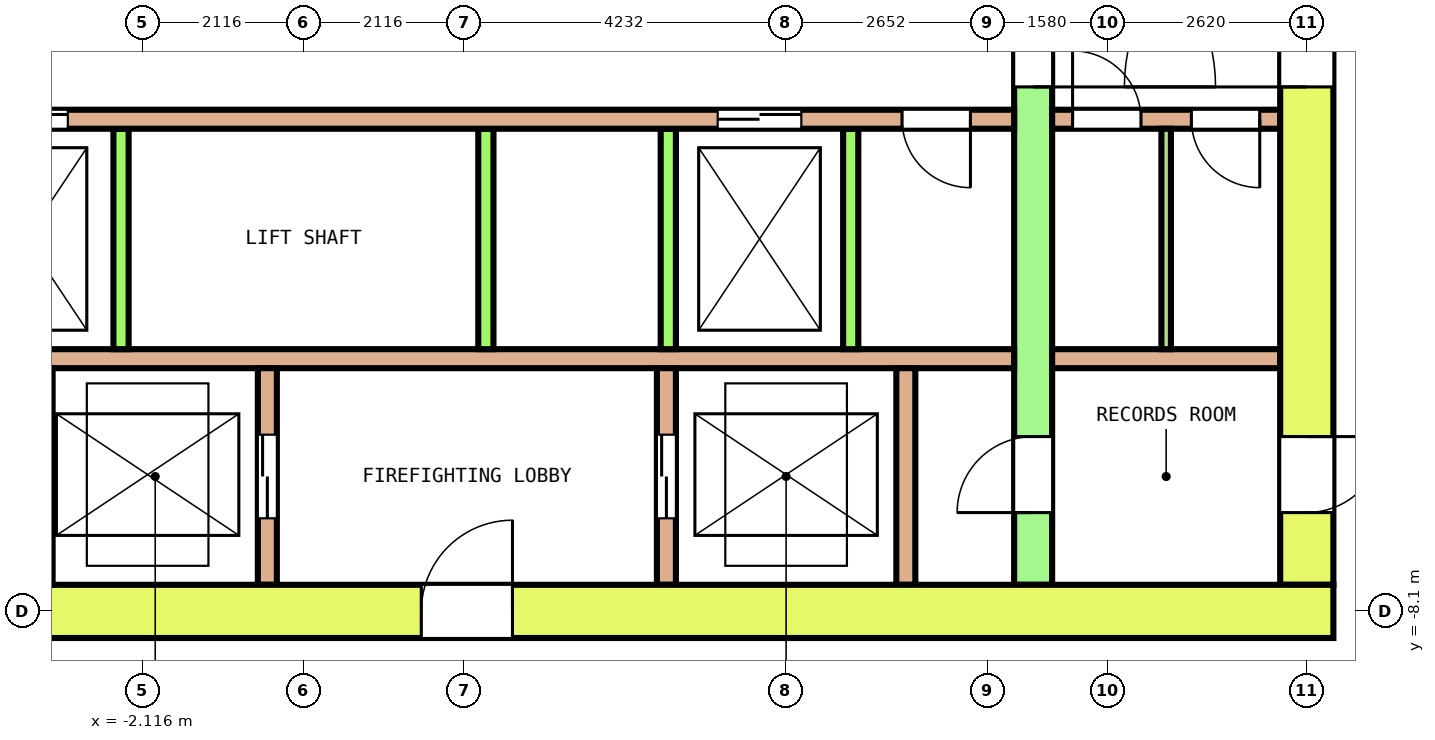
"""IFC4 building model, lengths in metres.
Left out: names, types, materials, properties, quantities, classifications, styles, units other than length and angle.
Written with IfcOpenShell. Run it as: python <this file> out.ifc"""

import sys

from ifc_helpers import new_model, si_unit, direction, frame, frame_2d, origin, place, context, subcontext, project, spatial, rectangle, extrude, element, fill, save


model = new_model("IFC4")
c1 = context("Model", 3, precision=1e-05, world=origin(), true_north=direction((0.0, 1.0)))
c2 = subcontext(c1, "Body", "Model", "MODEL_VIEW")
j1 = project(units=[si_unit("LENGTHUNIT", "METRE"), si_unit("PLANEANGLEUNIT", "RADIAN")], contexts=[c1])
p1 = place(None, origin())
s1 = spatial("IfcSite", under=j1, at=p1, CompositionType="ELEMENT")
p2 = place(p1, origin())
s2 = spatial("IfcBuilding", under=s1, at=p2, CompositionType="ELEMENT")
p3 = place(p2, frame((0.0, 0.0, 167.2)))
s3 = spatial("IfcBuildingStorey", under=s2, at=p3, CompositionType="ELEMENT", Elevation=167.2)
p4 = place(p3, frame((-13.55, -8.1, 0.0), z_axis=(0.0, 0.0, 1.0), x_axis=(1.0, 0.0, 0.0)))
e1 = element("IfcWall", 1, at=p4, inside=s3, PredefinedType="SHEAR", context=c2, shape_type="SweptSolid", body=[
    extrude(rectangle(XDim=27.1, YDim=0.7, at=frame_2d((13.55, 0.0))), origin(), (0.0, 0.0, 1.0), 4.1),
])
p5 = place(p4, frame((15.1, 0.0, 0.0)))
e2 = element("IfcOpeningElement", 2, at=p5, cuts=e1, PredefinedType="OPENING", context=c2, shape_type="SweptSolid", body=[
    extrude(rectangle(XDim=1.2, YDim=2.1, at=frame_2d((0.6, 1.05))), frame((0.0, 0.36, 0.0), z_axis=(0.0, -1.0, 0.0), x_axis=(1.0, 0.0, 0.0)), (0.0, 0.0, 1.0), 0.72),
])
p6 = place(p3, frame((13.2, -7.75, 0.0), z_axis=(0.0, 0.0, 1.0), x_axis=(0.0, 1.0, 0.0)))
e3 = element("IfcWall", 3, at=p6, inside=s3, PredefinedType="SHEAR", context=c2, shape_type="SweptSolid", body=[
    extrude(rectangle(XDim=15.5, YDim=0.7, at=frame_2d((7.75, 0.0))), origin(), (0.0, 0.0, 1.0), 4.1),
])
p7 = place(p6, frame((6.55, 0.0, 0.0)))
e4 = element("IfcOpeningElement", 4, at=p7, cuts=e3, PredefinedType="OPENING", context=c2, shape_type="SweptSolid", body=[
    extrude(rectangle(XDim=2.4, YDim=2.1, at=frame_2d((1.2, 1.05))), frame((0.0, 0.36, 0.0), z_axis=(0.0, -1.0, 0.0), x_axis=(1.0, 0.0, 0.0)), (0.0, 0.0, 1.0), 0.72),
])
p8 = place(p6, frame((13.45, 0.0, 0.0)))
e5 = element("IfcOpeningElement", 5, at=p8, cuts=e3, PredefinedType="OPENING", context=c2, shape_type="SweptSolid", body=[
    extrude(rectangle(XDim=1.2, YDim=2.1, at=frame_2d((0.6, 1.05))), frame((0.0, 0.36, 0.0), z_axis=(0.0, -1.0, 0.0), x_axis=(1.0, 0.0, 0.0)), (0.0, 0.0, 1.0), 0.72),
])
p9 = place(p6, frame((0.95, 0.0, 0.0)))
e6 = element("IfcOpeningElement", 6, at=p9, cuts=e3, PredefinedType="OPENING", context=c2, shape_type="SweptSolid", body=[
    extrude(rectangle(XDim=1.0, YDim=2.1, at=frame_2d((0.5, 1.05))), frame((0.0, 0.36, 0.0), z_axis=(0.0, -1.0, 0.0), x_axis=(1.0, 0.0, 0.0)), (0.0, 0.0, 1.0), 0.72),
])
p10 = place(p3, frame((9.6, -7.75, 0.0), z_axis=(0.0, 0.0, 1.0), x_axis=(0.0, 1.0, 0.0)))
e7 = element("IfcWall", 7, at=p10, inside=s3, PredefinedType="SHEAR", context=c2, shape_type="SweptSolid", body=[
    extrude(rectangle(XDim=15.5, YDim=0.5, at=frame_2d((7.75, 0.0))), origin(), (0.0, 0.0, 1.0), 4.1),
])
p11 = place(p10, frame((6.55, 0.0, 0.0)))
e8 = element("IfcOpeningElement", 8, at=p11, cuts=e7, PredefinedType="OPENING", context=c2, shape_type="SweptSolid", body=[
    extrude(rectangle(XDim=2.4, YDim=2.1, at=frame_2d((1.2, 1.05))), frame((0.0, 0.26, 0.0), z_axis=(0.0, -1.0, 0.0), x_axis=(1.0, 0.0, 0.0)), (0.0, 0.0, 1.0), 0.52),
])
p12 = place(p10, frame((13.45, 0.0, 0.0)))
e9 = element("IfcOpeningElement", 9, at=p12, cuts=e7, PredefinedType="OPENING", context=c2, shape_type="SweptSolid", body=[
    extrude(rectangle(XDim=1.2, YDim=2.1, at=frame_2d((0.6, 1.05))), frame((0.0, 0.26, 0.0), z_axis=(0.0, -1.0, 0.0), x_axis=(1.0, 0.0, 0.0)), (0.0, 0.0, 1.0), 0.52),
])
p13 = place(p10, frame((0.95, 0.0, 0.0)))
e10 = element("IfcOpeningElement", 10, at=p13, cuts=e7, PredefinedType="OPENING", context=c2, shape_type="SweptSolid", body=[
    extrude(rectangle(XDim=1.0, YDim=2.1, at=frame_2d((0.5, 1.05))), frame((0.0, 0.26, 0.0), z_axis=(0.0, -1.0, 0.0), x_axis=(1.0, 0.0, 0.0)), (0.0, 0.0, 1.0), 0.52),
])
p14 = place(p3, frame((-9.35, -1.625, 0.0), z_axis=(0.0, 0.0, 1.0), x_axis=(1.0, 0.0, 0.0)))
e11 = element("IfcWall", 11, at=p14, inside=s3, PredefinedType="SOLIDWALL", context=c2, shape_type="SweptSolid", body=[
    extrude(rectangle(XDim=18.7, YDim=0.25, at=frame_2d((9.35, 0.0))), origin(), (0.0, 0.0, 1.0), 4.1),
])
p15 = place(p14, frame((2.85, 0.0, 0.0)))
e12 = element("IfcOpeningElement", 12, at=p15, cuts=e11, PredefinedType="OPENING", context=c2, shape_type="SweptSolid", body=[
    extrude(rectangle(XDim=1.1, YDim=2.1, at=frame_2d((0.55, 1.05))), frame((0.0, 0.135, 0.0), z_axis=(0.0, -1.0, 0.0), x_axis=(1.0, 0.0, 0.0)), (0.0, 0.0, 1.0), 0.27),
])
p16 = place(p14, frame((5.15, 0.0, 0.0)))
e13 = element("IfcOpeningElement", 13, at=p16, cuts=e11, PredefinedType="OPENING", context=c2, shape_type="SweptSolid", body=[
    extrude(rectangle(XDim=1.1, YDim=2.1, at=frame_2d((0.55, 1.05))), frame((0.0, 0.135, 0.0), z_axis=(0.0, -1.0, 0.0), x_axis=(1.0, 0.0, 0.0)), (0.0, 0.0, 1.0), 0.27),
])
p17 = place(p14, frame((14.8, 0.0, 0.0)))
e14 = element("IfcOpeningElement", 14, at=p17, cuts=e11, PredefinedType="OPENING", context=c2, shape_type="SweptSolid", body=[
    extrude(rectangle(XDim=1.1, YDim=2.1, at=frame_2d((0.55, 1.05))), frame((0.0, 0.135, 0.0), z_axis=(0.0, -1.0, 0.0), x_axis=(1.0, 0.0, 0.0)), (0.0, 0.0, 1.0), 0.27),
])
p18 = place(p14, frame((0.575, 0.0, 0.0)))
e15 = element("IfcOpeningElement", 15, at=p18, cuts=e11, PredefinedType="OPENING", context=c2, shape_type="SweptSolid", body=[
    extrude(rectangle(XDim=0.9, YDim=2.1, at=frame_2d((0.45, 1.05))), frame((0.0, 0.135, 0.0), z_axis=(0.0, -1.0, 0.0), x_axis=(1.0, 0.0, 0.0)), (0.0, 0.0, 1.0), 0.27),
])
p19 = place(p14, frame((17.225, 0.0, 0.0)))
e16 = element("IfcOpeningElement", 16, at=p19, cuts=e11, PredefinedType="OPENING", context=c2, shape_type="SweptSolid", body=[
    extrude(rectangle(XDim=0.9, YDim=2.1, at=frame_2d((0.45, 1.05))), frame((0.0, 0.135, 0.0), z_axis=(0.0, -1.0, 0.0), x_axis=(1.0, 0.0, 0.0)), (0.0, 0.0, 1.0), 0.27),
])
p20 = place(p3, frame((9.85, -1.625, 0.0), z_axis=(0.0, 0.0, 1.0), x_axis=(1.0, 0.0, 0.0)))
e17 = element("IfcWall", 17, at=p20, inside=s3, PredefinedType="SOLIDWALL", context=c2, shape_type="SweptSolid", body=[
    extrude(rectangle(XDim=3.0, YDim=0.25, at=frame_2d((1.5, 0.0))), origin(), (0.0, 0.0, 1.0), 4.1),
])
p21 = place(p20, frame((0.269, 0.0, 0.0)))
e18 = element("IfcOpeningElement", 18, at=p21, cuts=e17, PredefinedType="OPENING", context=c2, shape_type="SweptSolid", body=[
    extrude(rectangle(XDim=0.9, YDim=2.1, at=frame_2d((0.45, 1.05))), frame((0.0, 0.135, 0.0), z_axis=(0.0, -1.0, 0.0), x_axis=(1.0, 0.0, 0.0)), (0.0, 0.0, 1.0), 0.27),
])
p22 = place(p20, frame((1.831, 0.0, 0.0)))
e19 = element("IfcOpeningElement", 19, at=p22, cuts=e17, PredefinedType="OPENING", context=c2, shape_type="SweptSolid", body=[
    extrude(rectangle(XDim=0.9, YDim=2.1, at=frame_2d((0.45, 1.05))), frame((0.0, 0.135, 0.0), z_axis=(0.0, -1.0, 0.0), x_axis=(1.0, 0.0, 0.0)), (0.0, 0.0, 1.0), 0.27),
])
p23 = place(p3, frame((-9.35, -4.775, 0.0), z_axis=(0.0, 0.0, 1.0), x_axis=(1.0, 0.0, 0.0)))
e20 = element("IfcWall", 20, at=p23, inside=s3, PredefinedType="SOLIDWALL", context=c2, shape_type="SweptSolid", body=[
    extrude(rectangle(XDim=18.7, YDim=0.25, at=frame_2d((9.35, 0.0))), origin(), (0.0, 0.0, 1.0), 4.1),
])
p24 = place(p3, frame((9.85, -4.775, 0.0), z_axis=(0.0, 0.0, 1.0), x_axis=(1.0, 0.0, 0.0)))
e21 = element("IfcWall", 21, at=p24, inside=s3, PredefinedType="SOLIDWALL", context=c2, shape_type="SweptSolid", body=[
    extrude(rectangle(XDim=3.0, YDim=0.25, at=frame_2d((1.5, 0.0))), origin(), (0.0, 0.0, 1.0), 4.1),
])
for number, where, z_axis, x_axis in (
    (22, (-2.4, -4.65, 0.0), (0.0, 0.0, 1.0), (0.0, 1.0, 0.0)),
    (23, (2.4, -4.65, 0.0), (0.0, 0.0, 1.0), (0.0, 1.0, 0.0)),
    (24, (4.8, -4.65, 0.0), (0.0, 0.0, 1.0), (0.0, 1.0, 0.0)),
    (25, (7.2, -4.65, 0.0), (0.0, 0.0, 1.0), (0.0, 1.0, 0.0)),
):
    element("IfcWall", number, at=place(p3, frame(where, z_axis=z_axis, x_axis=x_axis)), inside=s3, PredefinedType="SOLIDWALL", context=c2, shape_type="SweptSolid", body=[
        extrude(rectangle(XDim=2.9, YDim=0.2, at=frame_2d((1.45, 0.0))), origin(), (0.0, 0.0, 1.0), 4.1),
    ])
p25 = place(p3, frame((-0.475, -7.75, 0.0), z_axis=(0.0, 0.0, 1.0), x_axis=(0.0, 1.0, 0.0)))
e26 = element("IfcWall", 26, at=p25, inside=s3, PredefinedType="SOLIDWALL", context=c2, shape_type="SweptSolid", body=[
    extrude(rectangle(XDim=2.85, YDim=0.25, at=frame_2d((1.425, 0.0))), origin(), (0.0, 0.0, 1.0), 4.1),
])
p26 = place(p25, frame((0.875, 0.0, 0.0)))
e27 = element("IfcOpeningElement", 27, at=p26, cuts=e26, PredefinedType="OPENING", context=c2, shape_type="SweptSolid", body=[
    extrude(rectangle(XDim=1.1, YDim=2.1, at=frame_2d((0.55, 1.05))), frame((0.0, 0.135, 0.0), z_axis=(0.0, -1.0, 0.0), x_axis=(1.0, 0.0, 0.0)), (0.0, 0.0, 1.0), 0.27),
])
p27 = place(p3, frame((4.775, -7.75, 0.0), z_axis=(0.0, 0.0, 1.0), x_axis=(0.0, 1.0, 0.0)))
e28 = element("IfcWall", 28, at=p27, inside=s3, PredefinedType="SOLIDWALL", context=c2, shape_type="SweptSolid", body=[
    extrude(rectangle(XDim=2.85, YDim=0.25, at=frame_2d((1.425, 0.0))), origin(), (0.0, 0.0, 1.0), 4.1),
])
p28 = place(p27, frame((0.875, 0.0, 0.0)))
e29 = element("IfcOpeningElement", 29, at=p28, cuts=e28, PredefinedType="OPENING", context=c2, shape_type="SweptSolid", body=[
    extrude(rectangle(XDim=1.1, YDim=2.1, at=frame_2d((0.55, 1.05))), frame((0.0, 0.135, 0.0), z_axis=(0.0, -1.0, 0.0), x_axis=(1.0, 0.0, 0.0)), (0.0, 0.0, 1.0), 0.27),
])
p29 = place(p3, frame((7.925, -7.75, 0.0), z_axis=(0.0, 0.0, 1.0), x_axis=(0.0, 1.0, 0.0)))
e30 = element("IfcWall", 30, at=p29, inside=s3, PredefinedType="SOLIDWALL", context=c2, shape_type="SweptSolid", body=[
    extrude(rectangle(XDim=2.85, YDim=0.25, at=frame_2d((1.425, 0.0))), origin(), (0.0, 0.0, 1.0), 4.1),
])
p30 = place(p3, frame((11.35, -4.65, 0.0), z_axis=(0.0, 0.0, 1.0), x_axis=(0.0, 1.0, 0.0)))
e31 = element("IfcWall", 31, at=p30, inside=s3, PredefinedType="PARTITIONING", context=c2, shape_type="SweptSolid", body=[
    extrude(rectangle(XDim=2.9, YDim=0.125, at=frame_2d((1.45, 0.0))), origin(), (0.0, 0.0, 1.0), 4.1),
])
p31 = place(p16, origin())
e32 = element("IfcDoor", 32, at=p31, inside=s3, OperationType="DOUBLE_DOOR_SLIDING", PredefinedType="DOOR", context=c2, shape_type="SweptSolid", body=[
    extrude(rectangle(XDim=1.1, YDim=2.1, at=frame_2d((0.55, 1.05))), frame((0.0, 0.075, 0.0), z_axis=(0.0, -1.0, 0.0), x_axis=(1.0, 0.0, 0.0)), (0.0, 0.0, 1.0), 0.15),
])
fill(e13, e32)
p32 = place(p17, origin())
e33 = element("IfcDoor", 33, at=p32, inside=s3, OperationType="DOUBLE_DOOR_SLIDING", PredefinedType="DOOR", context=c2, shape_type="SweptSolid", body=[
    extrude(rectangle(XDim=1.1, YDim=2.1, at=frame_2d((0.55, 1.05))), frame((0.0, 0.075, 0.0), z_axis=(0.0, -1.0, 0.0), x_axis=(1.0, 0.0, 0.0)), (0.0, 0.0, 1.0), 0.15),
])
fill(e14, e33)
p33 = place(p26, origin())
e34 = element("IfcDoor", 34, at=p33, inside=s3, OperationType="DOUBLE_DOOR_SLIDING", PredefinedType="DOOR", context=c2, shape_type="SweptSolid", body=[
    extrude(rectangle(XDim=1.1, YDim=2.1, at=frame_2d((0.55, 1.05))), frame((0.0, 0.075, 0.0), z_axis=(0.0, -1.0, 0.0), x_axis=(1.0, 0.0, 0.0)), (0.0, 0.0, 1.0), 0.15),
])
fill(e27, e34)
p34 = place(p28, origin())
e35 = element("IfcDoor", 35, at=p34, inside=s3, OperationType="DOUBLE_DOOR_SLIDING", PredefinedType="DOOR", context=c2, shape_type="SweptSolid", body=[
    extrude(rectangle(XDim=1.1, YDim=2.1, at=frame_2d((0.55, 1.05))), frame((0.0, 0.075, 0.0), z_axis=(0.0, -1.0, 0.0), x_axis=(1.0, 0.0, 0.0)), (0.0, 0.0, 1.0), 0.15),
])
fill(e29, e35)
p35 = place(p11, origin())
e36 = element("IfcDoor", 36, at=p35, inside=s3, OperationType="DOUBLE_DOOR_SINGLE_SWING", PredefinedType="DOOR", context=c2, shape_type="SweptSolid", body=[
    extrude(rectangle(XDim=2.4, YDim=2.1, at=frame_2d((1.2, 1.05))), frame((0.0, 0.2, 0.0), z_axis=(0.0, -1.0, 0.0), x_axis=(1.0, 0.0, 0.0)), (0.0, 0.0, 1.0), 0.4),
])
fill(e8, e36)
p36 = place(p7, origin())
e37 = element("IfcDoor", 37, at=p36, inside=s3, OperationType="DOUBLE_DOOR_SINGLE_SWING", PredefinedType="DOOR", context=c2, shape_type="SweptSolid", body=[
    extrude(rectangle(XDim=2.4, YDim=2.1, at=frame_2d((1.2, 1.05))), frame((0.0, 0.3, 0.0), z_axis=(0.0, -1.0, 0.0), x_axis=(1.0, 0.0, 0.0)), (0.0, 0.0, 1.0), 0.6),
])
fill(e4, e37)
p37 = place(p5, origin())
e38 = element("IfcDoor", 38, at=p37, inside=s3, OperationType="SINGLE_SWING_LEFT", PredefinedType="DOOR", context=c2, shape_type="SweptSolid", body=[
    extrude(rectangle(XDim=1.2, YDim=2.1, at=frame_2d((0.6, 1.05))), frame((0.0, 0.3, 0.0), z_axis=(0.0, -1.0, 0.0), x_axis=(1.0, 0.0, 0.0)), (0.0, 0.0, 1.0), 0.6),
])
fill(e2, e38)
p38 = place(p13, origin())
e39 = element("IfcDoor", 39, at=p38, inside=s3, OperationType="SINGLE_SWING_LEFT", PredefinedType="DOOR", context=c2, shape_type="SweptSolid", body=[
    extrude(rectangle(XDim=1.0, YDim=2.1, at=frame_2d((0.5, 1.05))), frame((0.0, 0.2, 0.0), z_axis=(0.0, -1.0, 0.0), x_axis=(1.0, 0.0, 0.0)), (0.0, 0.0, 1.0), 0.4),
])
fill(e10, e39)
p39 = place(p9, origin())
e40 = element("IfcDoor", 40, at=p39, inside=s3, OperationType="SINGLE_SWING_RIGHT", PredefinedType="DOOR", context=c2, shape_type="SweptSolid", body=[
    extrude(rectangle(XDim=1.0, YDim=2.1, at=frame_2d((0.5, 1.05))), frame((0.0, 0.3, 0.0), z_axis=(0.0, -1.0, 0.0), x_axis=(1.0, 0.0, 0.0)), (0.0, 0.0, 1.0), 0.6),
])
fill(e6, e40)
p40 = place(p19, origin())
e41 = element("IfcDoor", 41, at=p40, inside=s3, OperationType="SINGLE_SWING_RIGHT", PredefinedType="DOOR", context=c2, shape_type="SweptSolid", body=[
    extrude(rectangle(XDim=0.9, YDim=2.1, at=frame_2d((0.45, 1.05))), frame((0.0, 0.075, 0.0), z_axis=(0.0, -1.0, 0.0), x_axis=(1.0, 0.0, 0.0)), (0.0, 0.0, 1.0), 0.15),
])
fill(e16, e41)
p41 = place(p21, origin())
e42 = element("IfcDoor", 42, at=p41, inside=s3, OperationType="SINGLE_SWING_LEFT", PredefinedType="DOOR", context=c2, shape_type="SweptSolid", body=[
    extrude(rectangle(XDim=0.9, YDim=2.1, at=frame_2d((0.45, 1.05))), frame((0.0, 0.075, 0.0), z_axis=(0.0, -1.0, 0.0), x_axis=(1.0, 0.0, 0.0)), (0.0, 0.0, 1.0), 0.15),
])
fill(e18, e42)
p42 = place(p22, origin())
e43 = element("IfcDoor", 43, at=p42, inside=s3, OperationType="SINGLE_SWING_RIGHT", PredefinedType="DOOR", context=c2, shape_type="SweptSolid", body=[
    extrude(rectangle(XDim=0.9, YDim=2.1, at=frame_2d((0.45, 1.05))), frame((0.0, 0.075, 0.0), z_axis=(0.0, -1.0, 0.0), x_axis=(1.0, 0.0, 0.0)), (0.0, 0.0, 1.0), 0.15),
])
fill(e19, e43)
save(model, sys.argv[1])
